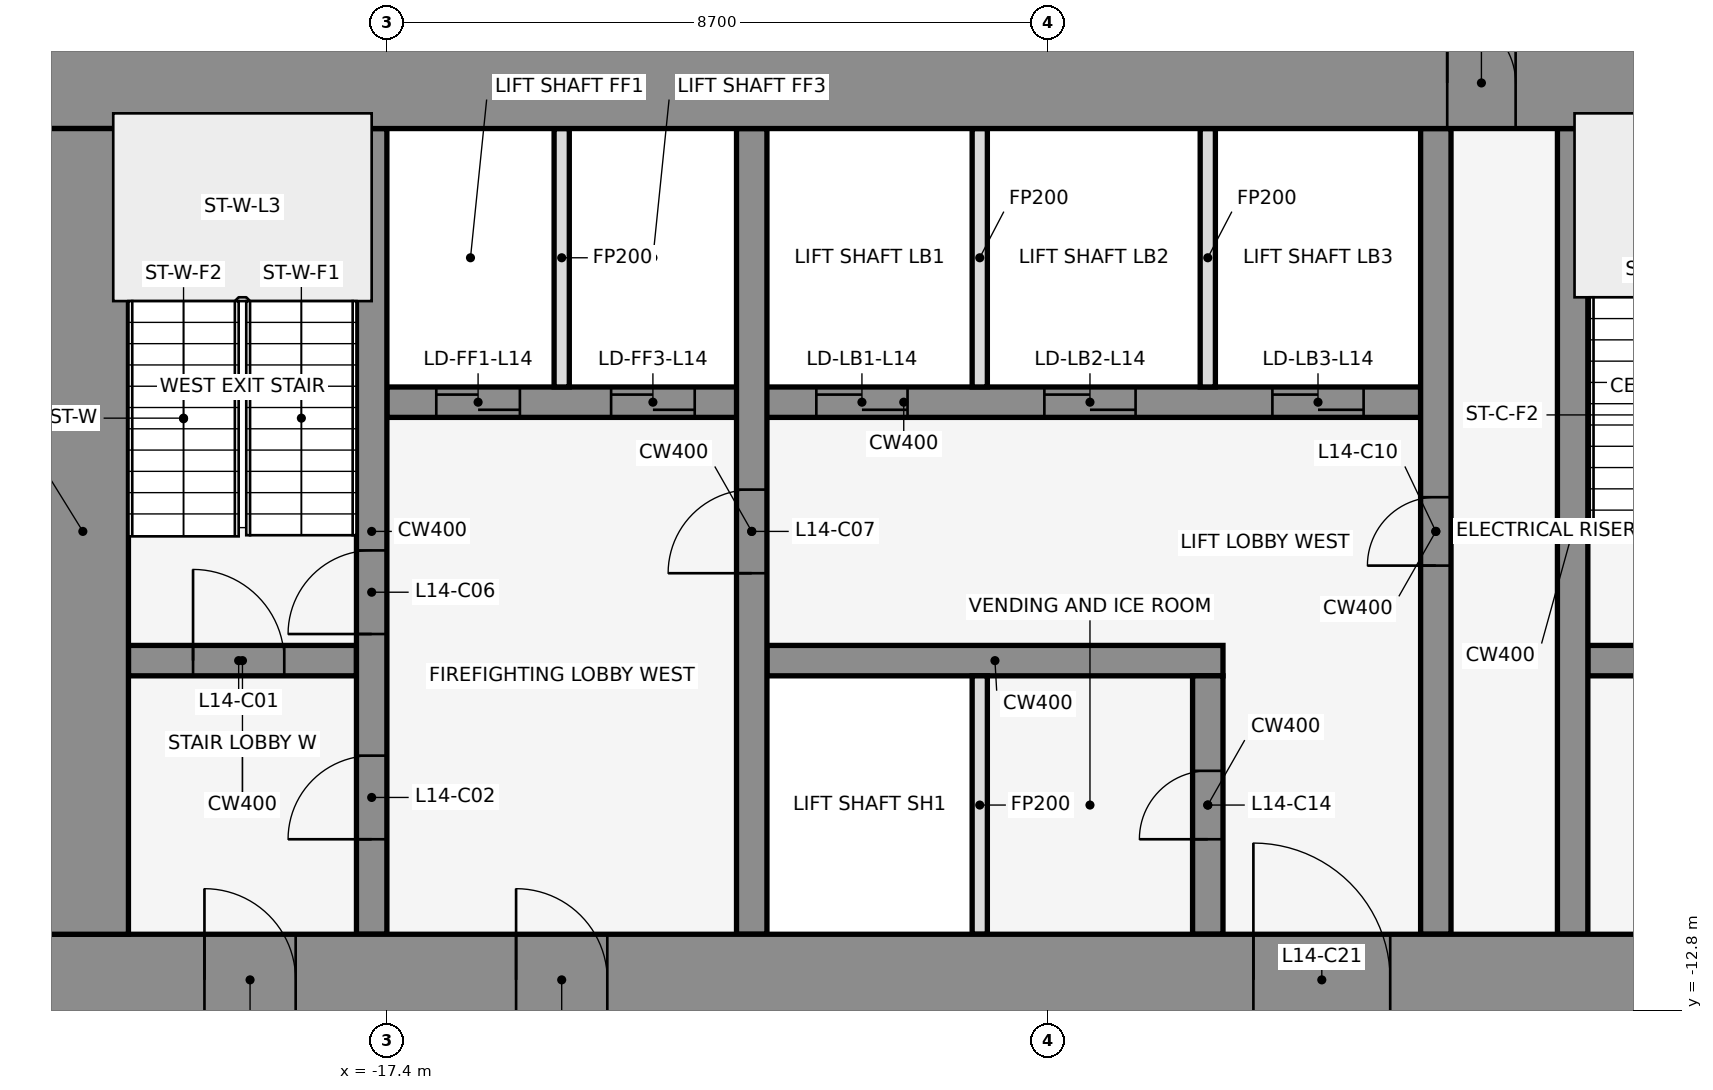
"""IFC4 building model, lengths in metres.
Left out: names, types, materials, properties, quantities, classifications, styles, units other than length and angle.
Written with IfcOpenShell. Run it as: python <this file> out.ifc"""

import sys

from ifc_helpers import new_model, si_unit, direction, frame, frame_2d, origin, place, context, subcontext, project, spatial, rectangle, extrude, element, fill, save


model = new_model("IFC4")
c1 = context("Model", 3, precision=1e-05, world=origin(), true_north=direction((0.0, 1.0)))
c2 = subcontext(c1, "Body", "Model", "MODEL_VIEW")
j1 = project(units=[si_unit("LENGTHUNIT", "METRE"), si_unit("PLANEANGLEUNIT", "RADIAN")], contexts=[c1])
p1 = place(None, origin())
s1 = spatial("IfcSite", under=j1, at=p1, CompositionType="ELEMENT")
p2 = place(p1, origin())
s2 = spatial("IfcBuilding", under=s1, at=p2, CompositionType="ELEMENT")
p3 = place(p2, frame((0.0, 0.0, 71.0)))
s3 = spatial("IfcBuildingStorey", under=s2, at=p3, CompositionType="ELEMENT", Elevation=71.0)
for number, where, z_axis, x_axis in (
    (1, (-0.068, -0.105, 0.0), (0.0, 0.0, 1.0), (-0.84, 0.543, 0.0)),
    (2, (-14.599, 1.08, 0.0), (0.0, 0.0, 1.0), (-0.84, -0.543, 0.0)),
):
    element("IfcWall", number, at=place(p3, frame(where, z_axis=z_axis, x_axis=x_axis)), inside=s3, PredefinedType="STANDARD", context=c2, shape_type="SweptSolid", body=[
        extrude(rectangle(XDim=2.183, YDim=0.25, at=frame_2d((1.091, 0.0))), origin(), (0.0, 0.0, 1.0), 4.35),
    ])
p4 = place(p3, frame((-20.8, -8.2, 0.0), z_axis=(0.0, 0.0, 1.0), x_axis=(1.0, 0.0, 0.0)))
e3 = element("IfcWall", 3, at=p4, inside=s3, PredefinedType="SHEAR", context=c2, shape_type="SweptSolid", body=[
    extrude(rectangle(XDim=3.0, YDim=0.4, at=frame_2d((1.5, 0.0))), origin(), (0.0, 0.0, 1.0), 4.5),
])
p5 = place(p4, frame((0.85, 0.0, 0.0)))
e4 = element("IfcOpeningElement", 4, at=p5, cuts=e3, PredefinedType="OPENING", context=c2, shape_type="SweptSolid", body=[
    extrude(rectangle(XDim=1.2, YDim=2.1, at=frame_2d((0.6, 1.05))), frame((0.0, 0.212, 0.0), z_axis=(0.0, -1.0, 0.0), x_axis=(1.0, 0.0, 0.0)), (0.0, 0.0, 1.0), 0.424),
])
p6 = place(p3, frame((-12.4, -8.2, 0.0), z_axis=(0.0, 0.0, 1.0), x_axis=(1.0, 0.0, 0.0)))
e5 = element("IfcWall", 5, at=p6, inside=s3, PredefinedType="SHEAR", context=c2, shape_type="SweptSolid", body=[
    extrude(rectangle(XDim=6.0, YDim=0.4, at=frame_2d((3.0, 0.0))), origin(), (0.0, 0.0, 1.0), 4.5),
])
p7 = place(p3, frame((-1.6, -8.2, 0.0), z_axis=(0.0, 0.0, 1.0), x_axis=(1.0, 0.0, 0.0)))
e6 = element("IfcWall", 6, at=p7, inside=s3, PredefinedType="SHEAR", context=c2, shape_type="SweptSolid", body=[
    extrude(rectangle(XDim=3.2, YDim=0.4, at=frame_2d((1.6, 0.0))), origin(), (0.0, 0.0, 1.0), 4.5),
])
p8 = place(p7, frame((1.05, 0.0, 0.0)))
e7 = element("IfcOpeningElement", 7, at=p8, cuts=e6, PredefinedType="OPENING", context=c2, shape_type="SweptSolid", body=[
    extrude(rectangle(XDim=1.2, YDim=2.1, at=frame_2d((0.6, 1.05))), frame((0.0, 0.212, 0.0), z_axis=(0.0, -1.0, 0.0), x_axis=(1.0, 0.0, 0.0)), (0.0, 0.0, 1.0), 0.424),
])
p9 = place(p3, frame((-17.4, -4.8, 0.0), z_axis=(0.0, 0.0, 1.0), x_axis=(1.0, 0.0, 0.0)))
e8 = element("IfcWall", 8, at=p9, inside=s3, PredefinedType="SHEAR", context=c2, shape_type="SweptSolid", body=[
    extrude(rectangle(XDim=13.6, YDim=0.4, at=frame_2d((6.8, 0.0))), origin(), (0.0, 0.0, 1.0), 4.5),
])
p10 = place(p9, frame((0.65, 0.0, 0.0)))
e9 = element("IfcOpeningElement", 9, at=p10, cuts=e8, PredefinedType="OPENING", context=c2, shape_type="SweptSolid", body=[
    extrude(rectangle(XDim=1.1, YDim=2.1, at=frame_2d((0.55, 1.05))), frame((0.0, 0.212, 0.0), z_axis=(0.0, -1.0, 0.0), x_axis=(1.0, 0.0, 0.0)), (0.0, 0.0, 1.0), 0.424),
])
p11 = place(p9, frame((2.95, 0.0, 0.0)))
e10 = element("IfcOpeningElement", 10, at=p11, cuts=e8, PredefinedType="OPENING", context=c2, shape_type="SweptSolid", body=[
    extrude(rectangle(XDim=1.1, YDim=2.1, at=frame_2d((0.55, 1.05))), frame((0.0, 0.212, 0.0), z_axis=(0.0, -1.0, 0.0), x_axis=(1.0, 0.0, 0.0)), (0.0, 0.0, 1.0), 0.424),
])
p12 = place(p9, frame((5.65, 0.0, 0.0)))
e11 = element("IfcOpeningElement", 11, at=p12, cuts=e8, PredefinedType="OPENING", context=c2, shape_type="SweptSolid", body=[
    extrude(rectangle(XDim=1.2, YDim=2.1, at=frame_2d((0.6, 1.05))), frame((0.0, 0.212, 0.0), z_axis=(0.0, -1.0, 0.0), x_axis=(1.0, 0.0, 0.0)), (0.0, 0.0, 1.0), 0.424),
])
p13 = place(p9, frame((8.65, 0.0, 0.0)))
e12 = element("IfcOpeningElement", 12, at=p13, cuts=e8, PredefinedType="OPENING", context=c2, shape_type="SweptSolid", body=[
    extrude(rectangle(XDim=1.2, YDim=2.1, at=frame_2d((0.6, 1.05))), frame((0.0, 0.212, 0.0), z_axis=(0.0, -1.0, 0.0), x_axis=(1.0, 0.0, 0.0)), (0.0, 0.0, 1.0), 0.424),
])
p14 = place(p9, frame((11.65, 0.0, 0.0)))
e13 = element("IfcOpeningElement", 13, at=p14, cuts=e8, PredefinedType="OPENING", context=c2, shape_type="SweptSolid", body=[
    extrude(rectangle(XDim=1.2, YDim=2.1, at=frame_2d((0.6, 1.05))), frame((0.0, 0.212, 0.0), z_axis=(0.0, -1.0, 0.0), x_axis=(1.0, 0.0, 0.0)), (0.0, 0.0, 1.0), 0.424),
])
p15 = place(p3, frame((-17.6, -11.8, 0.0), z_axis=(0.0, 0.0, 1.0), x_axis=(0.0, 1.0, 0.0)))
e14 = element("IfcWall", 14, at=p15, inside=s3, PredefinedType="SHEAR", context=c2, shape_type="SweptSolid", body=[
    extrude(rectangle(XDim=10.6, YDim=0.4, at=frame_2d((5.3, 0.0))), origin(), (0.0, 0.0, 1.0), 4.5),
])
p16 = place(p15, frame((1.25, 0.0, 0.0)))
e15 = element("IfcOpeningElement", 15, at=p16, cuts=e14, PredefinedType="OPENING", context=c2, shape_type="SweptSolid", body=[
    extrude(rectangle(XDim=1.1, YDim=2.1, at=frame_2d((0.55, 1.05))), frame((0.0, 0.212, 0.0), z_axis=(0.0, -1.0, 0.0), x_axis=(1.0, 0.0, 0.0)), (0.0, 0.0, 1.0), 0.424),
])
p17 = place(p15, frame((3.95, 0.0, 0.0)))
e16 = element("IfcOpeningElement", 16, at=p17, cuts=e14, PredefinedType="OPENING", context=c2, shape_type="SweptSolid", body=[
    extrude(rectangle(XDim=1.1, YDim=2.1, at=frame_2d((0.55, 1.05))), frame((0.0, 0.212, 0.0), z_axis=(0.0, -1.0, 0.0), x_axis=(1.0, 0.0, 0.0)), (0.0, 0.0, 1.0), 0.424),
])
p18 = place(p3, frame((-15.1, -4.6, 0.0), z_axis=(0.0, 0.0, 1.0), x_axis=(0.0, 1.0, 0.0)))
e17 = element("IfcWall", 17, at=p18, inside=s3, PredefinedType="PARTITIONING", context=c2, shape_type="SweptSolid", body=[
    extrude(rectangle(XDim=3.4, YDim=0.2, at=frame_2d((1.7, 0.0))), origin(), (0.0, 0.0, 1.0), 3.418),
])
p19 = place(p3, frame((-12.6, -11.8, 0.0), z_axis=(0.0, 0.0, 1.0), x_axis=(0.0, 1.0, 0.0)))
e18 = element("IfcWall", 18, at=p19, inside=s3, PredefinedType="SHEAR", context=c2, shape_type="SweptSolid", body=[
    extrude(rectangle(XDim=10.6, YDim=0.4, at=frame_2d((5.3, 0.0))), origin(), (0.0, 0.0, 1.0), 4.5),
])
p20 = place(p19, frame((4.75, 0.0, 0.0)))
e19 = element("IfcOpeningElement", 19, at=p20, cuts=e18, PredefinedType="OPENING", context=c2, shape_type="SweptSolid", body=[
    extrude(rectangle(XDim=1.1, YDim=2.1, at=frame_2d((0.55, 1.05))), frame((0.0, 0.212, 0.0), z_axis=(0.0, -1.0, 0.0), x_axis=(1.0, 0.0, 0.0)), (0.0, 0.0, 1.0), 0.424),
])
for number, where, z_axis, x_axis in (
    (20, (-9.6, -11.8, 0.0), (0.0, 0.0, 1.0), (0.0, 1.0, 0.0)),
    (21, (-9.6, -4.6, 0.0), (0.0, 0.0, 1.0), (0.0, 1.0, 0.0)),
):
    element("IfcWall", number, at=place(p3, frame(where, z_axis=z_axis, x_axis=x_axis)), inside=s3, PredefinedType="PARTITIONING", context=c2, shape_type="SweptSolid", body=[
        extrude(rectangle(XDim=3.4, YDim=0.2, at=frame_2d((1.7, 0.0))), origin(), (0.0, 0.0, 1.0), 3.418),
    ])
p21 = place(p3, frame((-6.6, -11.8, 0.0), z_axis=(0.0, 0.0, 1.0), x_axis=(0.0, 1.0, 0.0)))
e22 = element("IfcWall", 22, at=p21, inside=s3, PredefinedType="SHEAR", context=c2, shape_type="SweptSolid", body=[
    extrude(rectangle(XDim=3.4, YDim=0.4, at=frame_2d((1.7, 0.0))), origin(), (0.0, 0.0, 1.0), 4.5),
])
p22 = place(p21, frame((1.25, 0.0, 0.0)))
e23 = element("IfcOpeningElement", 23, at=p22, cuts=e22, PredefinedType="OPENING", context=c2, shape_type="SweptSolid", body=[
    extrude(rectangle(XDim=0.9, YDim=2.1, at=frame_2d((0.45, 1.05))), frame((0.0, 0.212, 0.0), z_axis=(0.0, -1.0, 0.0), x_axis=(1.0, 0.0, 0.0)), (0.0, 0.0, 1.0), 0.424),
])
p23 = place(p3, frame((-6.6, -4.6, 0.0), z_axis=(0.0, 0.0, 1.0), x_axis=(0.0, 1.0, 0.0)))
e24 = element("IfcWall", 24, at=p23, inside=s3, PredefinedType="PARTITIONING", context=c2, shape_type="SweptSolid", body=[
    extrude(rectangle(XDim=3.4, YDim=0.2, at=frame_2d((1.7, 0.0))), origin(), (0.0, 0.0, 1.0), 3.418),
])
p24 = place(p3, frame((-3.6, -11.8, 0.0), z_axis=(0.0, 0.0, 1.0), x_axis=(0.0, 1.0, 0.0)))
e25 = element("IfcWall", 25, at=p24, inside=s3, PredefinedType="SHEAR", context=c2, shape_type="SweptSolid", body=[
    extrude(rectangle(XDim=10.6, YDim=0.4, at=frame_2d((5.3, 0.0))), origin(), (0.0, 0.0, 1.0), 4.5),
])
p25 = place(p24, frame((4.85, 0.0, 0.0)))
e26 = element("IfcOpeningElement", 26, at=p25, cuts=e25, PredefinedType="OPENING", context=c2, shape_type="SweptSolid", body=[
    extrude(rectangle(XDim=0.9, YDim=2.1, at=frame_2d((0.45, 1.05))), frame((0.0, 0.212, 0.0), z_axis=(0.0, -1.0, 0.0), x_axis=(1.0, 0.0, 0.0)), (0.0, 0.0, 1.0), 0.424),
])
p26 = place(p3, frame((-1.8, -11.8, 0.0), z_axis=(0.0, 0.0, 1.0), x_axis=(0.0, 1.0, 0.0)))
e27 = element("IfcWall", 27, at=p26, inside=s3, PredefinedType="SHEAR", context=c2, shape_type="SweptSolid", body=[
    extrude(rectangle(XDim=10.6, YDim=0.4, at=frame_2d((5.3, 0.0))), origin(), (0.0, 0.0, 1.0), 4.5),
])
p27 = place(p3, frame((-22.0, -0.6, 0.0), z_axis=(0.0, 0.0, 1.0), x_axis=(1.0, 0.0, 0.0)))
e28 = element("IfcWall", 28, at=p27, inside=s3, PredefinedType="SHEAR", context=c2, shape_type="SweptSolid", body=[
    extrude(rectangle(XDim=44.0, YDim=1.2, at=frame_2d((22.0, 0.0))), origin(), (0.0, 0.0, 1.0), 4.5),
])
p28 = place(p27, frame((18.55, 0.0, 0.0)))
e29 = element("IfcOpeningElement", 29, at=p28, cuts=e28, PredefinedType="OPENING", context=c2, shape_type="SweptSolid", body=[
    extrude(rectangle(XDim=0.9, YDim=2.1, at=frame_2d((0.45, 1.05))), frame((0.0, 0.612, 0.0), z_axis=(0.0, -1.0, 0.0), x_axis=(1.0, 0.0, 0.0)), (0.0, 0.0, 1.0), 1.224),
])
p29 = place(p27, frame((24.55, 0.0, 0.0)))
e30 = element("IfcOpeningElement", 30, at=p29, cuts=e28, PredefinedType="OPENING", context=c2, shape_type="SweptSolid", body=[
    extrude(rectangle(XDim=0.9, YDim=2.1, at=frame_2d((0.45, 1.05))), frame((0.0, 0.612, 0.0), z_axis=(0.0, -1.0, 0.0), x_axis=(1.0, 0.0, 0.0)), (0.0, 0.0, 1.0), 1.224),
])
p30 = place(p3, frame((-22.0, -12.4, 0.0), z_axis=(0.0, 0.0, 1.0), x_axis=(1.0, 0.0, 0.0)))
e31 = element("IfcWall", 31, at=p30, inside=s3, PredefinedType="SHEAR", context=c2, shape_type="SweptSolid", body=[
    extrude(rectangle(XDim=44.0, YDim=1.2, at=frame_2d((22.0, 0.0))), origin(), (0.0, 0.0, 1.0), 4.5),
])
p31 = place(p30, frame((2.2, 0.0, 0.0)))
e32 = element("IfcOpeningElement", 32, at=p31, cuts=e31, PredefinedType="OPENING", context=c2, shape_type="SweptSolid", body=[
    extrude(rectangle(XDim=1.2, YDim=2.1, at=frame_2d((0.6, 1.05))), frame((0.0, 0.612, 0.0), z_axis=(0.0, -1.0, 0.0), x_axis=(1.0, 0.0, 0.0)), (0.0, 0.0, 1.0), 1.224),
])
p32 = place(p30, frame((21.4, 0.0, 0.0)))
e33 = element("IfcOpeningElement", 33, at=p32, cuts=e31, PredefinedType="OPENING", context=c2, shape_type="SweptSolid", body=[
    extrude(rectangle(XDim=1.2, YDim=2.1, at=frame_2d((0.6, 1.05))), frame((0.0, 0.612, 0.0), z_axis=(0.0, -1.0, 0.0), x_axis=(1.0, 0.0, 0.0)), (0.0, 0.0, 1.0), 1.224),
])
p33 = place(p30, frame((40.6, 0.0, 0.0)))
e34 = element("IfcOpeningElement", 34, at=p33, cuts=e31, PredefinedType="OPENING", context=c2, shape_type="SweptSolid", body=[
    extrude(rectangle(XDim=1.2, YDim=2.1, at=frame_2d((0.6, 1.05))), frame((0.0, 0.612, 0.0), z_axis=(0.0, -1.0, 0.0), x_axis=(1.0, 0.0, 0.0)), (0.0, 0.0, 1.0), 1.224),
])
p34 = place(p30, frame((16.0, 0.0, 0.0)))
e35 = element("IfcOpeningElement", 35, at=p34, cuts=e31, PredefinedType="OPENING", context=c2, shape_type="SweptSolid", body=[
    extrude(rectangle(XDim=1.8, YDim=2.1, at=frame_2d((0.9, 1.05))), frame((0.0, 0.612, 0.0), z_axis=(0.0, -1.0, 0.0), x_axis=(1.0, 0.0, 0.0)), (0.0, 0.0, 1.0), 1.224),
])
p35 = place(p30, frame((6.3, 0.0, 0.0)))
e36 = element("IfcOpeningElement", 36, at=p35, cuts=e31, PredefinedType="OPENING", context=c2, shape_type="SweptSolid", body=[
    extrude(rectangle(XDim=1.2, YDim=2.1, at=frame_2d((0.6, 1.05))), frame((0.0, 0.612, 0.0), z_axis=(0.0, -1.0, 0.0), x_axis=(1.0, 0.0, 0.0)), (0.0, 0.0, 1.0), 1.224),
])
p36 = place(p30, frame((26.2, 0.0, 0.0)))
e37 = element("IfcOpeningElement", 37, at=p36, cuts=e31, PredefinedType="OPENING", context=c2, shape_type="SweptSolid", body=[
    extrude(rectangle(XDim=1.8, YDim=2.1, at=frame_2d((0.9, 1.05))), frame((0.0, 0.612, 0.0), z_axis=(0.0, -1.0, 0.0), x_axis=(1.0, 0.0, 0.0)), (0.0, 0.0, 1.0), 1.224),
])
p37 = place(p30, frame((36.5, 0.0, 0.0)))
e38 = element("IfcOpeningElement", 38, at=p37, cuts=e31, PredefinedType="OPENING", context=c2, shape_type="SweptSolid", body=[
    extrude(rectangle(XDim=1.2, YDim=2.1, at=frame_2d((0.6, 1.05))), frame((0.0, 0.612, 0.0), z_axis=(0.0, -1.0, 0.0), x_axis=(1.0, 0.0, 0.0)), (0.0, 0.0, 1.0), 1.224),
])
p38 = place(p3, frame((-21.4, -11.8, 0.0), z_axis=(0.0, 0.0, 1.0), x_axis=(0.0, 1.0, 0.0)))
e39 = element("IfcWall", 39, at=p38, inside=s3, PredefinedType="SHEAR", context=c2, shape_type="SweptSolid", body=[
    extrude(rectangle(XDim=10.6, YDim=1.2, at=frame_2d((5.3, 0.0))), origin(), (0.0, 0.0, 1.0), 4.5),
])
p39 = place(p5, origin())
e40 = element("IfcDoor", 40, at=p39, inside=s3, OperationType="SINGLE_SWING_LEFT", PredefinedType="DOOR", context=c2, shape_type="SweptSolid", body=[
    extrude(rectangle(XDim=1.2, YDim=2.1, at=frame_2d((0.6, 1.05))), frame((0.0, 0.025, 0.0), z_axis=(0.0, -1.0, 0.0), x_axis=(1.0, 0.0, 0.0)), (0.0, 0.0, 1.0), 0.05),
])
fill(e4, e40)
p40 = place(p16, frame((1.1, 0.0, 0.0), z_axis=(0.0, 0.0, 1.0), x_axis=(-1.0, 0.0, 0.0)))
e41 = element("IfcDoor", 41, at=p40, inside=s3, OperationType="SINGLE_SWING_LEFT", PredefinedType="DOOR", context=c2, shape_type="SweptSolid", body=[
    extrude(rectangle(XDim=1.1, YDim=2.1, at=frame_2d((0.55, 1.05))), frame((0.0, 0.025, 0.0), z_axis=(0.0, -1.0, 0.0), x_axis=(1.0, 0.0, 0.0)), (0.0, 0.0, 1.0), 0.05),
])
fill(e15, e41)
p41 = place(p10, origin())
e42 = element("IfcDoor", 42, at=p41, inside=s3, OperationType="DOUBLE_DOOR_SLIDING", PredefinedType="DOOR", context=c2, shape_type="SweptSolid", body=[
    extrude(rectangle(XDim=1.1, YDim=2.1, at=frame_2d((0.55, 1.05))), frame((0.0, 0.025, 0.0), z_axis=(0.0, -1.0, 0.0), x_axis=(1.0, 0.0, 0.0)), (0.0, 0.0, 1.0), 0.05),
])
fill(e9, e42)
p42 = place(p11, origin())
e43 = element("IfcDoor", 43, at=p42, inside=s3, OperationType="DOUBLE_DOOR_SLIDING", PredefinedType="DOOR", context=c2, shape_type="SweptSolid", body=[
    extrude(rectangle(XDim=1.1, YDim=2.1, at=frame_2d((0.55, 1.05))), frame((0.0, 0.025, 0.0), z_axis=(0.0, -1.0, 0.0), x_axis=(1.0, 0.0, 0.0)), (0.0, 0.0, 1.0), 0.05),
])
fill(e10, e43)
p43 = place(p12, origin())
e44 = element("IfcDoor", 44, at=p43, inside=s3, OperationType="DOUBLE_DOOR_SLIDING", PredefinedType="DOOR", context=c2, shape_type="SweptSolid", body=[
    extrude(rectangle(XDim=1.2, YDim=2.1, at=frame_2d((0.6, 1.05))), frame((0.0, 0.025, 0.0), z_axis=(0.0, -1.0, 0.0), x_axis=(1.0, 0.0, 0.0)), (0.0, 0.0, 1.0), 0.05),
])
fill(e11, e44)
p44 = place(p13, origin())
e45 = element("IfcDoor", 45, at=p44, inside=s3, OperationType="DOUBLE_DOOR_SLIDING", PredefinedType="DOOR", context=c2, shape_type="SweptSolid", body=[
    extrude(rectangle(XDim=1.2, YDim=2.1, at=frame_2d((0.6, 1.05))), frame((0.0, 0.025, 0.0), z_axis=(0.0, -1.0, 0.0), x_axis=(1.0, 0.0, 0.0)), (0.0, 0.0, 1.0), 0.05),
])
fill(e12, e45)
p45 = place(p14, origin())
e46 = element("IfcDoor", 46, at=p45, inside=s3, OperationType="DOUBLE_DOOR_SLIDING", PredefinedType="DOOR", context=c2, shape_type="SweptSolid", body=[
    extrude(rectangle(XDim=1.2, YDim=2.1, at=frame_2d((0.6, 1.05))), frame((0.0, 0.025, 0.0), z_axis=(0.0, -1.0, 0.0), x_axis=(1.0, 0.0, 0.0)), (0.0, 0.0, 1.0), 0.05),
])
fill(e13, e46)
p46 = place(p17, frame((1.1, 0.0, 0.0), z_axis=(0.0, 0.0, 1.0), x_axis=(-1.0, 0.0, 0.0)))
e47 = element("IfcDoor", 47, at=p46, inside=s3, OperationType="SINGLE_SWING_LEFT", PredefinedType="DOOR", context=c2, shape_type="SweptSolid", body=[
    extrude(rectangle(XDim=1.1, YDim=2.1, at=frame_2d((0.55, 1.05))), frame((0.0, 0.025, 0.0), z_axis=(0.0, -1.0, 0.0), x_axis=(1.0, 0.0, 0.0)), (0.0, 0.0, 1.0), 0.05),
])
fill(e16, e47)
p47 = place(p20, origin())
e48 = element("IfcDoor", 48, at=p47, inside=s3, OperationType="SINGLE_SWING_LEFT", PredefinedType="DOOR", context=c2, shape_type="SweptSolid", body=[
    extrude(rectangle(XDim=1.1, YDim=2.1, at=frame_2d((0.55, 1.05))), frame((0.0, 0.025, 0.0), z_axis=(0.0, -1.0, 0.0), x_axis=(1.0, 0.0, 0.0)), (0.0, 0.0, 1.0), 0.05),
])
fill(e19, e48)
p48 = place(p25, frame((0.9, 0.0, 0.0), z_axis=(0.0, 0.0, 1.0), x_axis=(-1.0, 0.0, 0.0)))
e49 = element("IfcDoor", 49, at=p48, inside=s3, OperationType="SINGLE_SWING_LEFT", PredefinedType="DOOR", context=c2, shape_type="SweptSolid", body=[
    extrude(rectangle(XDim=0.9, YDim=2.1, at=frame_2d((0.45, 1.05))), frame((0.0, 0.025, 0.0), z_axis=(0.0, -1.0, 0.0), x_axis=(1.0, 0.0, 0.0)), (0.0, 0.0, 1.0), 0.05),
])
fill(e26, e49)
p49 = place(p22, origin())
e50 = element("IfcDoor", 50, at=p49, inside=s3, OperationType="SINGLE_SWING_RIGHT", PredefinedType="DOOR", context=c2, shape_type="SweptSolid", body=[
    extrude(rectangle(XDim=0.9, YDim=2.1, at=frame_2d((0.45, 1.05))), frame((0.0, 0.025, 0.0), z_axis=(0.0, -1.0, 0.0), x_axis=(1.0, 0.0, 0.0)), (0.0, 0.0, 1.0), 0.05),
])
fill(e23, e50)
p50 = place(p28, origin())
e51 = element("IfcDoor", 51, at=p50, inside=s3, OperationType="SINGLE_SWING_LEFT", PredefinedType="DOOR", context=c2, shape_type="SweptSolid", body=[
    extrude(rectangle(XDim=0.9, YDim=2.1, at=frame_2d((0.45, 1.05))), frame((0.0, 0.025, 0.0), z_axis=(0.0, -1.0, 0.0), x_axis=(1.0, 0.0, 0.0)), (0.0, 0.0, 1.0), 0.05),
])
fill(e29, e51)
p51 = place(p31, frame((1.2, 0.0, 0.0), z_axis=(0.0, 0.0, 1.0), x_axis=(-1.0, 0.0, 0.0)))
e52 = element("IfcDoor", 52, at=p51, inside=s3, OperationType="SINGLE_SWING_RIGHT", PredefinedType="DOOR", context=c2, shape_type="SweptSolid", body=[
    extrude(rectangle(XDim=1.2, YDim=2.1, at=frame_2d((0.6, 1.05))), frame((0.0, 0.025, 0.0), z_axis=(0.0, -1.0, 0.0), x_axis=(1.0, 0.0, 0.0)), (0.0, 0.0, 1.0), 0.05),
])
fill(e32, e52)
p52 = place(p34, origin())
e53 = element("IfcDoor", 53, at=p52, inside=s3, OperationType="SINGLE_SWING_LEFT", PredefinedType="DOOR", context=c2, shape_type="SweptSolid", body=[
    extrude(rectangle(XDim=1.8, YDim=2.1, at=frame_2d((0.9, 1.05))), frame((0.0, 0.025, 0.0), z_axis=(0.0, -1.0, 0.0), x_axis=(1.0, 0.0, 0.0)), (0.0, 0.0, 1.0), 0.05),
])
fill(e35, e53)
p53 = place(p35, frame((1.2, 0.0, 0.0), z_axis=(0.0, 0.0, 1.0), x_axis=(-1.0, 0.0, 0.0)))
e54 = element("IfcDoor", 54, at=p53, inside=s3, OperationType="SINGLE_SWING_RIGHT", PredefinedType="DOOR", context=c2, shape_type="SweptSolid", body=[
    extrude(rectangle(XDim=1.2, YDim=2.1, at=frame_2d((0.6, 1.05))), frame((0.0, 0.025, 0.0), z_axis=(0.0, -1.0, 0.0), x_axis=(1.0, 0.0, 0.0)), (0.0, 0.0, 1.0), 0.05),
])
fill(e36, e54)
save(model, sys.argv[1])
